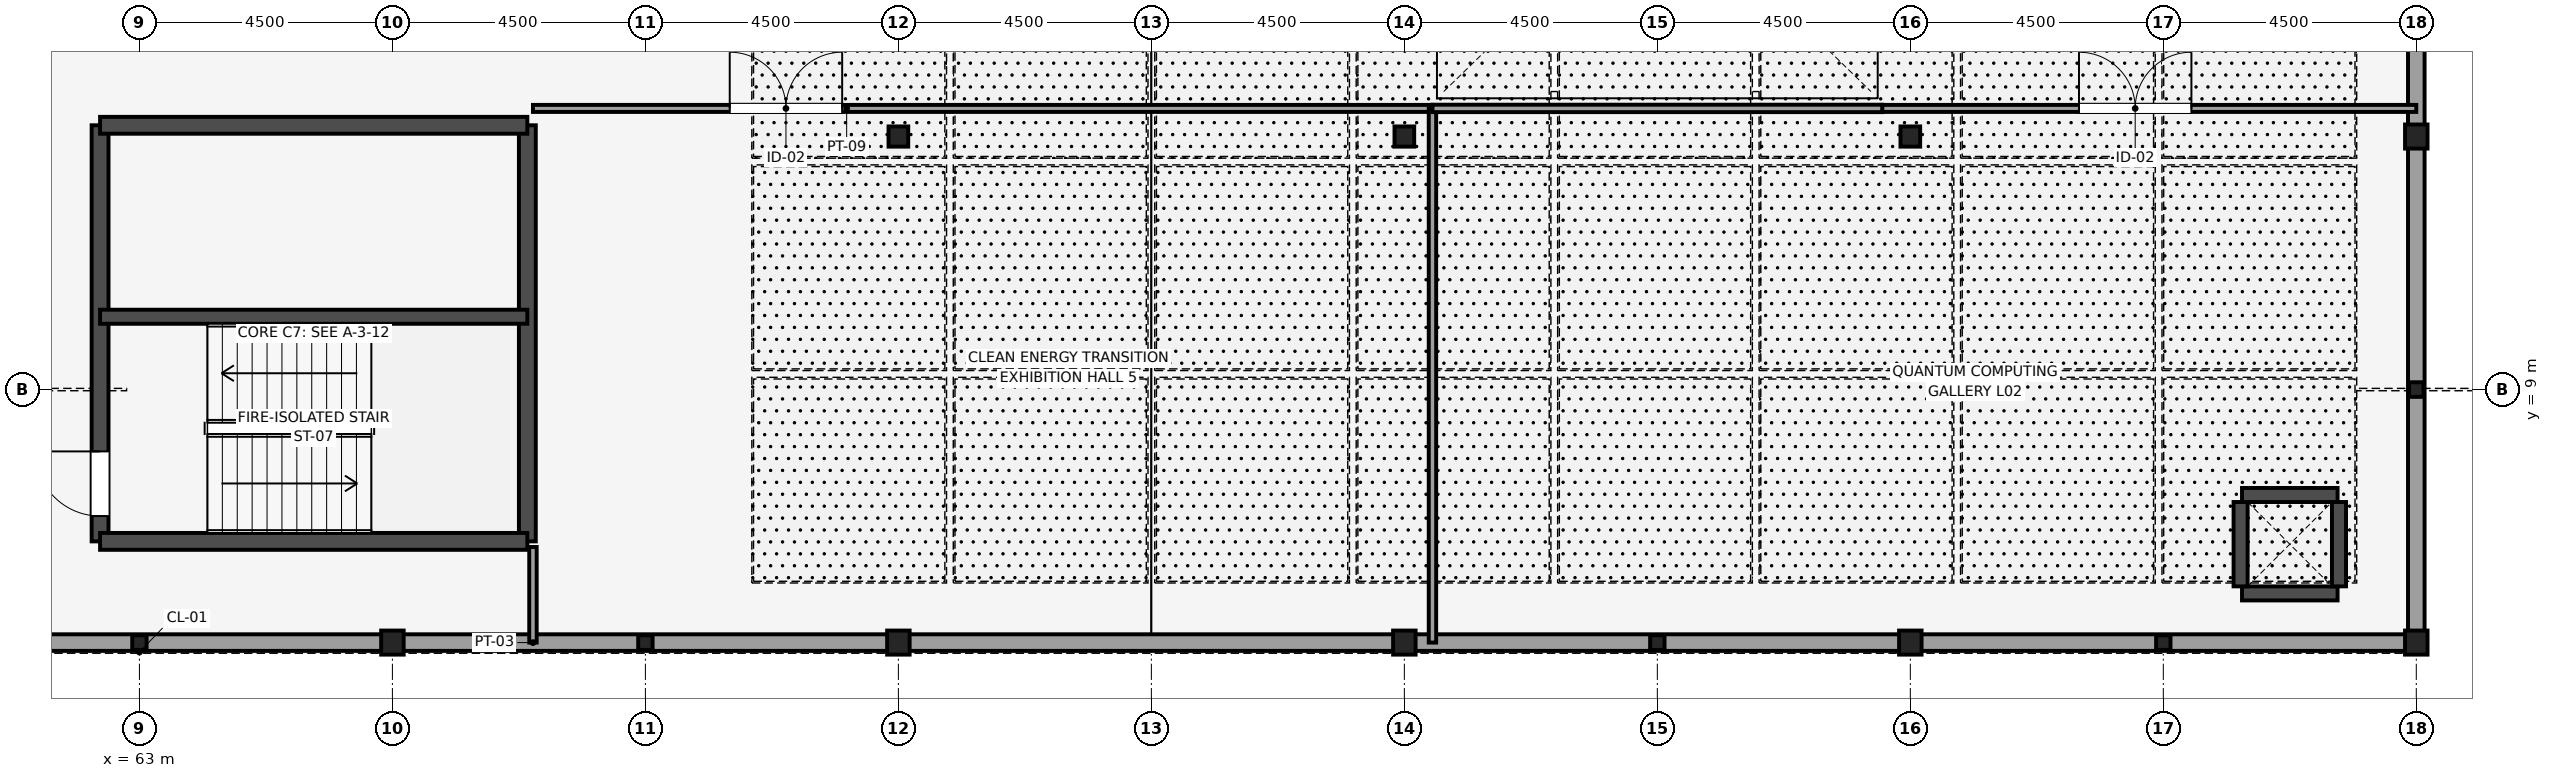
"""IFC4 building model, lengths in metres.
Left out: names, types, materials, properties, quantities, classifications, styles, units other than length and angle.
Written with IfcOpenShell. Run it as: python <this file> out.ifc"""

import sys

from ifc_helpers import new_model, si_unit, direction, frame, frame_2d, origin, origin_2d, place, context, subcontext, project, spatial, rectangle, i_section, extrude, element, fill, save


model = new_model("IFC4")
c1 = context("Model", 3, precision=1e-05, world=origin(), true_north=direction((0.0, 1.0)))
c2 = subcontext(c1, "Body", "Model", "MODEL_VIEW")
j1 = project(units=[si_unit("LENGTHUNIT", "METRE"), si_unit("PLANEANGLEUNIT", "RADIAN")], contexts=[c1])
p1 = place(None, origin())
s1 = spatial("IfcSite", under=j1, at=p1, CompositionType="ELEMENT")
p2 = place(p1, origin())
s2 = spatial("IfcBuilding", under=s1, at=p2, CompositionType="ELEMENT")
p3 = place(p2, frame((0.0, 0.0, 9.9)))
s3 = spatial("IfcBuildingStorey", under=s2, at=p3, CompositionType="ELEMENT", Elevation=9.9)
for number, where, z_axis, x_axis in (
    (1, (67.5, 4.5, 0.0), (0.0, 0.0, 1.0), (1.0, 0.0, 0.0)),
    (2, (76.5, 4.5, 0.0), (0.0, 0.0, 1.0), (1.0, 0.0, 0.0)),
):
    element("IfcColumn", number, at=place(p3, frame(where, z_axis=z_axis, x_axis=x_axis)), inside=s3, PredefinedType="COLUMN", context=c2, shape_type="SweptSolid", body=[
        extrude(i_section(OverallWidth=0.4, OverallDepth=0.428, WebThickness=0.02, FlangeThickness=0.028, FilletRadius=0.016, at=origin_2d()), origin(), (0.0, 0.0, 1.0), 4.5),
    ])
p4 = place(p3, frame((76.5, 13.5, 0.0), z_axis=(0.0, 0.0, 1.0), x_axis=(1.0, 0.0, 0.0)))
e3 = element("IfcColumn", 3, at=p4, inside=s3, PredefinedType="COLUMN", context=c2, shape_type="SweptSolid", body=[
    extrude(i_section(OverallWidth=0.35, OverallDepth=0.359, WebThickness=0.016, FlangeThickness=0.024, FilletRadius=0.014, at=origin_2d()), origin(), (0.0, 0.0, 1.0), 4.5),
])
p5 = place(p3, frame((85.5, 4.5, 0.0), z_axis=(0.0, 0.0, 1.0), x_axis=(1.0, 0.0, 0.0)))
e4 = element("IfcColumn", 4, at=p5, inside=s3, PredefinedType="COLUMN", context=c2, shape_type="SweptSolid", body=[
    extrude(i_section(OverallWidth=0.4, OverallDepth=0.428, WebThickness=0.02, FlangeThickness=0.028, FilletRadius=0.016, at=origin_2d()), origin(), (0.0, 0.0, 1.0), 4.5),
])
p6 = place(p3, frame((85.5, 13.5, 0.0), z_axis=(0.0, 0.0, 1.0), x_axis=(1.0, 0.0, 0.0)))
e5 = element("IfcColumn", 5, at=p6, inside=s3, PredefinedType="COLUMN", context=c2, shape_type="SweptSolid", body=[
    extrude(i_section(OverallWidth=0.35, OverallDepth=0.359, WebThickness=0.016, FlangeThickness=0.024, FilletRadius=0.014, at=origin_2d()), origin(), (0.0, 0.0, 1.0), 4.5),
])
p7 = place(p3, frame((94.5, 4.5, 0.0), z_axis=(0.0, 0.0, 1.0), x_axis=(1.0, 0.0, 0.0)))
e6 = element("IfcColumn", 6, at=p7, inside=s3, PredefinedType="COLUMN", context=c2, shape_type="SweptSolid", body=[
    extrude(i_section(OverallWidth=0.4, OverallDepth=0.428, WebThickness=0.02, FlangeThickness=0.028, FilletRadius=0.016, at=origin_2d()), origin(), (0.0, 0.0, 1.0), 4.5),
])
p8 = place(p3, frame((94.5, 13.5, 0.0), z_axis=(0.0, 0.0, 1.0), x_axis=(1.0, 0.0, 0.0)))
e7 = element("IfcColumn", 7, at=p8, inside=s3, PredefinedType="COLUMN", context=c2, shape_type="SweptSolid", body=[
    extrude(i_section(OverallWidth=0.35, OverallDepth=0.359, WebThickness=0.016, FlangeThickness=0.024, FilletRadius=0.014, at=origin_2d()), origin(), (0.0, 0.0, 1.0), 4.5),
])
for number, where, z_axis, x_axis in (
    (8, (103.5, 4.5, 0.0), (0.0, 0.0, 1.0), (1.0, 0.0, 0.0)),
    (9, (103.5, 13.5, 0.0), (0.0, 0.0, 1.0), (1.0, 0.0, 0.0)),
):
    element("IfcColumn", number, at=place(p3, frame(where, z_axis=z_axis, x_axis=x_axis)), inside=s3, PredefinedType="COLUMN", context=c2, shape_type="SweptSolid", body=[
        extrude(i_section(OverallWidth=0.4, OverallDepth=0.428, WebThickness=0.02, FlangeThickness=0.028, FilletRadius=0.016, at=origin_2d()), origin(), (0.0, 0.0, 1.0), 4.5),
    ])
for number, where, z_axis, x_axis in (
    (10, (63.0, 4.5, 0.0), (0.0, 0.0, 1.0), (1.0, 0.0, 0.0)),
    (11, (72.0, 4.5, 0.0), (0.0, 0.0, 1.0), (1.0, 0.0, 0.0)),
    (12, (90.0, 4.5, 0.0), (0.0, 0.0, 1.0), (1.0, 0.0, 0.0)),
    (13, (99.0, 4.5, 0.0), (0.0, 0.0, 1.0), (1.0, 0.0, 0.0)),
    (14, (103.5, 9.0, 0.0), (0.0, 0.0, 1.0), (1.0, 0.0, 0.0)),
):
    element("IfcColumn", number, at=place(p3, frame(where, z_axis=z_axis, x_axis=x_axis)), inside=s3, PredefinedType="PILASTER", context=c2, shape_type="SweptSolid", body=[
        extrude(i_section(OverallWidth=0.256, OverallDepth=0.26, WebThickness=0.01, FlangeThickness=0.017, FilletRadius=0.014, at=origin_2d()), origin(), (0.0, 0.0, 1.0), 4.5),
    ])
p9 = place(p3, frame((62.3, 6.3, 0.0), z_axis=(0.0, 0.0, 1.0), x_axis=(0.0, 1.0, 0.0)))
e15 = element("IfcWall", 15, at=p9, inside=s3, PredefinedType="SHEAR", context=c2, shape_type="SweptSolid", body=[
    extrude(rectangle(XDim=7.4, YDim=0.3, at=frame_2d((3.7, 0.0))), origin(), (0.0, 0.0, 1.0), 4.5),
])
p10 = place(p9, frame((0.45, 0.0, 0.0)))
e16 = element("IfcOpeningElement", 16, at=p10, cuts=e15, PredefinedType="OPENING", context=c2, shape_type="SweptSolid", body=[
    extrude(rectangle(XDim=1.15, YDim=2.15, at=frame_2d((0.575, 1.075))), frame((0.0, 0.16, 0.0), z_axis=(0.0, -1.0, 0.0), x_axis=(1.0, 0.0, 0.0)), (0.0, 0.0, 1.0), 0.32),
])
p11 = place(p3, frame((69.9, 6.3, 0.0), z_axis=(0.0, 0.0, 1.0), x_axis=(0.0, 1.0, 0.0)))
e17 = element("IfcWall", 17, at=p11, inside=s3, PredefinedType="SHEAR", context=c2, shape_type="SweptSolid", body=[
    extrude(rectangle(XDim=7.4, YDim=0.3, at=frame_2d((3.7, 0.0))), origin(), (0.0, 0.0, 1.0), 4.5),
])
for number, where, z_axis, x_axis in (
    (18, (62.3, 6.3, 0.0), (0.0, 0.0, 1.0), (1.0, 0.0, 0.0)),
    (19, (62.3, 13.7, 0.0), (0.0, 0.0, 1.0), (1.0, 0.0, 0.0)),
):
    element("IfcWall", number, at=place(p3, frame(where, z_axis=z_axis, x_axis=x_axis)), inside=s3, PredefinedType="SHEAR", context=c2, shape_type="SweptSolid", body=[
        extrude(rectangle(XDim=7.6, YDim=0.3, at=frame_2d((3.8, 0.0))), origin(), (0.0, 0.0, 1.0), 4.5),
    ])
p12 = place(p3, frame((62.3, 10.295, 0.0), z_axis=(0.0, 0.0, 1.0), x_axis=(1.0, 0.0, 0.0)))
e20 = element("IfcWall", 20, at=p12, inside=s3, PredefinedType="SHEAR", context=c2, shape_type="SweptSolid", body=[
    extrude(rectangle(XDim=7.6, YDim=0.25, at=frame_2d((3.8, 0.0))), origin(), (0.0, 0.0, 1.0), 4.5),
])
for number, where, z_axis, x_axis in (
    (21, (100.4, 5.375, 0.0), (0.0, 0.0, 1.0), (1.0, 0.0, 0.0)),
    (22, (100.4, 7.125, 0.0), (0.0, 0.0, 1.0), (1.0, 0.0, 0.0)),
):
    element("IfcWall", number, at=place(p3, frame(where, z_axis=z_axis, x_axis=x_axis)), inside=s3, PredefinedType="SHEAR", context=c2, shape_type="SweptSolid", body=[
        extrude(rectangle(XDim=1.7, YDim=0.25, at=frame_2d((0.85, 0.0))), origin(), (0.0, 0.0, 1.0), 3.77),
    ])
for number, where, z_axis, x_axis in (
    (23, (100.375, 5.5, 0.0), (0.0, 0.0, 1.0), (0.0, 1.0, 0.0)),
    (24, (102.125, 5.5, 0.0), (0.0, 0.0, 1.0), (0.0, 1.0, 0.0)),
):
    element("IfcWall", number, at=place(p3, frame(where, z_axis=z_axis, x_axis=x_axis)), inside=s3, PredefinedType="SHEAR", context=c2, shape_type="SweptSolid", body=[
        extrude(rectangle(XDim=1.5, YDim=0.25, at=frame_2d((0.75, 0.0))), origin(), (0.0, 0.0, 1.0), 3.77),
    ])
for number, where, z_axis, x_axis in (
    (25, (58.5, 4.5, 0.0), (0.0, 0.0, 1.0), (1.0, 0.0, 0.0)),
    (26, (67.5, 4.5, 0.0), (0.0, 0.0, 1.0), (1.0, 0.0, 0.0)),
    (27, (76.5, 4.5, 0.0), (0.0, 0.0, 1.0), (1.0, 0.0, 0.0)),
    (28, (85.5, 4.5, 0.0), (0.0, 0.0, 1.0), (1.0, 0.0, 0.0)),
    (29, (94.5, 4.5, 0.0), (0.0, 0.0, 1.0), (1.0, 0.0, 0.0)),
    (30, (103.5, 4.5, 0.0), (0.0, 0.0, 1.0), (0.0, 1.0, 0.0)),
    (31, (103.5, 13.5, 0.0), (0.0, 0.0, 1.0), (0.0, 1.0, 0.0)),
):
    element("IfcWall", number, at=place(p3, frame(where, z_axis=z_axis, x_axis=x_axis)), inside=s3, PredefinedType="STANDARD", context=c2, shape_type="SweptSolid", body=[
        extrude(rectangle(XDim=9.0, YDim=0.295, at=frame_2d((4.5, 0.0))), origin(), (0.0, 0.0, 1.0), 3.846),
    ])
p13 = place(p3, frame((70.0, 4.5, 0.0), z_axis=(0.0, 0.0, 1.0), x_axis=(0.0, 1.0, 0.0)))
e32 = element("IfcWall", 32, at=p13, inside=s3, PredefinedType="PARTITIONING", context=c2, shape_type="SweptSolid", body=[
    extrude(rectangle(XDim=1.7, YDim=0.132, at=frame_2d((0.85, 0.0))), origin(), (0.0, 0.0, 1.0), 4.32),
])
p14 = place(p3, frame((70.0, 14.0, 0.0), z_axis=(0.0, 0.0, 1.0), x_axis=(1.0, 0.0, 0.0)))
e33 = element("IfcWall", 33, at=p14, inside=s3, PredefinedType="MOVABLE", context=c2, shape_type="SweptSolid", body=[
    extrude(rectangle(XDim=16.0, YDim=0.125, at=frame_2d((8.0, 0.0))), origin(), (0.0, 0.0, 1.0), 4.32),
])
p15 = place(p14, frame((3.5, 0.0, 0.0)))
e34 = element("IfcOpeningElement", 34, at=p15, cuts=e33, PredefinedType="OPENING", context=c2, shape_type="SweptSolid", body=[
    extrude(rectangle(XDim=2.0, YDim=2.4, at=frame_2d((1.0, 1.2))), frame((0.0, 0.073, 0.0), z_axis=(0.0, -1.0, 0.0), x_axis=(1.0, 0.0, 0.0)), (0.0, 0.0, 1.0), 0.145),
])
p16 = place(p3, frame((86.0, 4.5, 0.0), z_axis=(0.0, 0.0, 1.0), x_axis=(0.0, 1.0, 0.0)))
e35 = element("IfcWall", 35, at=p16, inside=s3, PredefinedType="PARTITIONING", context=c2, shape_type="SweptSolid", body=[
    extrude(rectangle(XDim=9.5, YDim=0.132, at=frame_2d((4.75, 0.0))), origin(), (0.0, 0.0, 1.0), 4.32),
])
p17 = place(p3, frame((94.0, 14.0, 0.0), z_axis=(0.0, 0.0, 1.0), x_axis=(1.0, 0.0, 0.0)))
e36 = element("IfcWall", 36, at=p17, inside=s3, PredefinedType="MOVABLE", context=c2, shape_type="SweptSolid", body=[
    extrude(rectangle(XDim=9.5, YDim=0.125, at=frame_2d((4.75, 0.0))), origin(), (0.0, 0.0, 1.0), 4.32),
])
p18 = place(p17, frame((3.5, 0.0, 0.0)))
e37 = element("IfcOpeningElement", 37, at=p18, cuts=e36, PredefinedType="OPENING", context=c2, shape_type="SweptSolid", body=[
    extrude(rectangle(XDim=2.0, YDim=2.4, at=frame_2d((1.0, 1.2))), frame((0.0, 0.073, 0.0), z_axis=(0.0, -1.0, 0.0), x_axis=(1.0, 0.0, 0.0)), (0.0, 0.0, 1.0), 0.145),
])
p19 = place(p3, frame((86.0, 14.0, 0.0), z_axis=(0.0, 0.0, 1.0), x_axis=(1.0, 0.0, 0.0)))
e38 = element("IfcWall", 38, at=p19, inside=s3, PredefinedType="PARTITIONING", context=c2, shape_type="SweptSolid", body=[
    extrude(rectangle(XDim=8.0, YDim=0.132, at=frame_2d((4.0, 0.0))), origin(), (0.0, 0.0, 1.0), 4.32),
])
p20 = place(p10, origin())
e39 = element("IfcDoor", 39, at=p20, inside=s3, OperationType="SINGLE_SWING_RIGHT", PredefinedType="DOOR", context=c2, shape_type="SweptSolid", body=[
    extrude(rectangle(XDim=1.15, YDim=2.15, at=frame_2d((0.575, 1.075))), frame((0.0, 0.025, 0.0), z_axis=(0.0, -1.0, 0.0), x_axis=(1.0, 0.0, 0.0)), (0.0, 0.0, 1.0), 0.05),
])
fill(e16, e39)
p21 = place(p15, origin())
e40 = element("IfcDoor", 40, at=p21, inside=s3, OperationType="DOUBLE_DOOR_DOUBLE_SWING", PredefinedType="DOOR", context=c2, shape_type="SweptSolid", body=[
    extrude(rectangle(XDim=2.0, YDim=2.4, at=frame_2d((1.0, 1.2))), frame((0.0, 0.025, 0.0), z_axis=(0.0, -1.0, 0.0), x_axis=(1.0, 0.0, 0.0)), (0.0, 0.0, 1.0), 0.05),
])
fill(e34, e40)
p22 = place(p18, origin())
e41 = element("IfcDoor", 41, at=p22, inside=s3, OperationType="DOUBLE_DOOR_DOUBLE_SWING", PredefinedType="DOOR", context=c2, shape_type="SweptSolid", body=[
    extrude(rectangle(XDim=2.0, YDim=2.4, at=frame_2d((1.0, 1.2))), frame((0.0, 0.025, 0.0), z_axis=(0.0, -1.0, 0.0), x_axis=(1.0, 0.0, 0.0)), (0.0, 0.0, 1.0), 0.05),
])
fill(e37, e41)
save(model, sys.argv[1])
